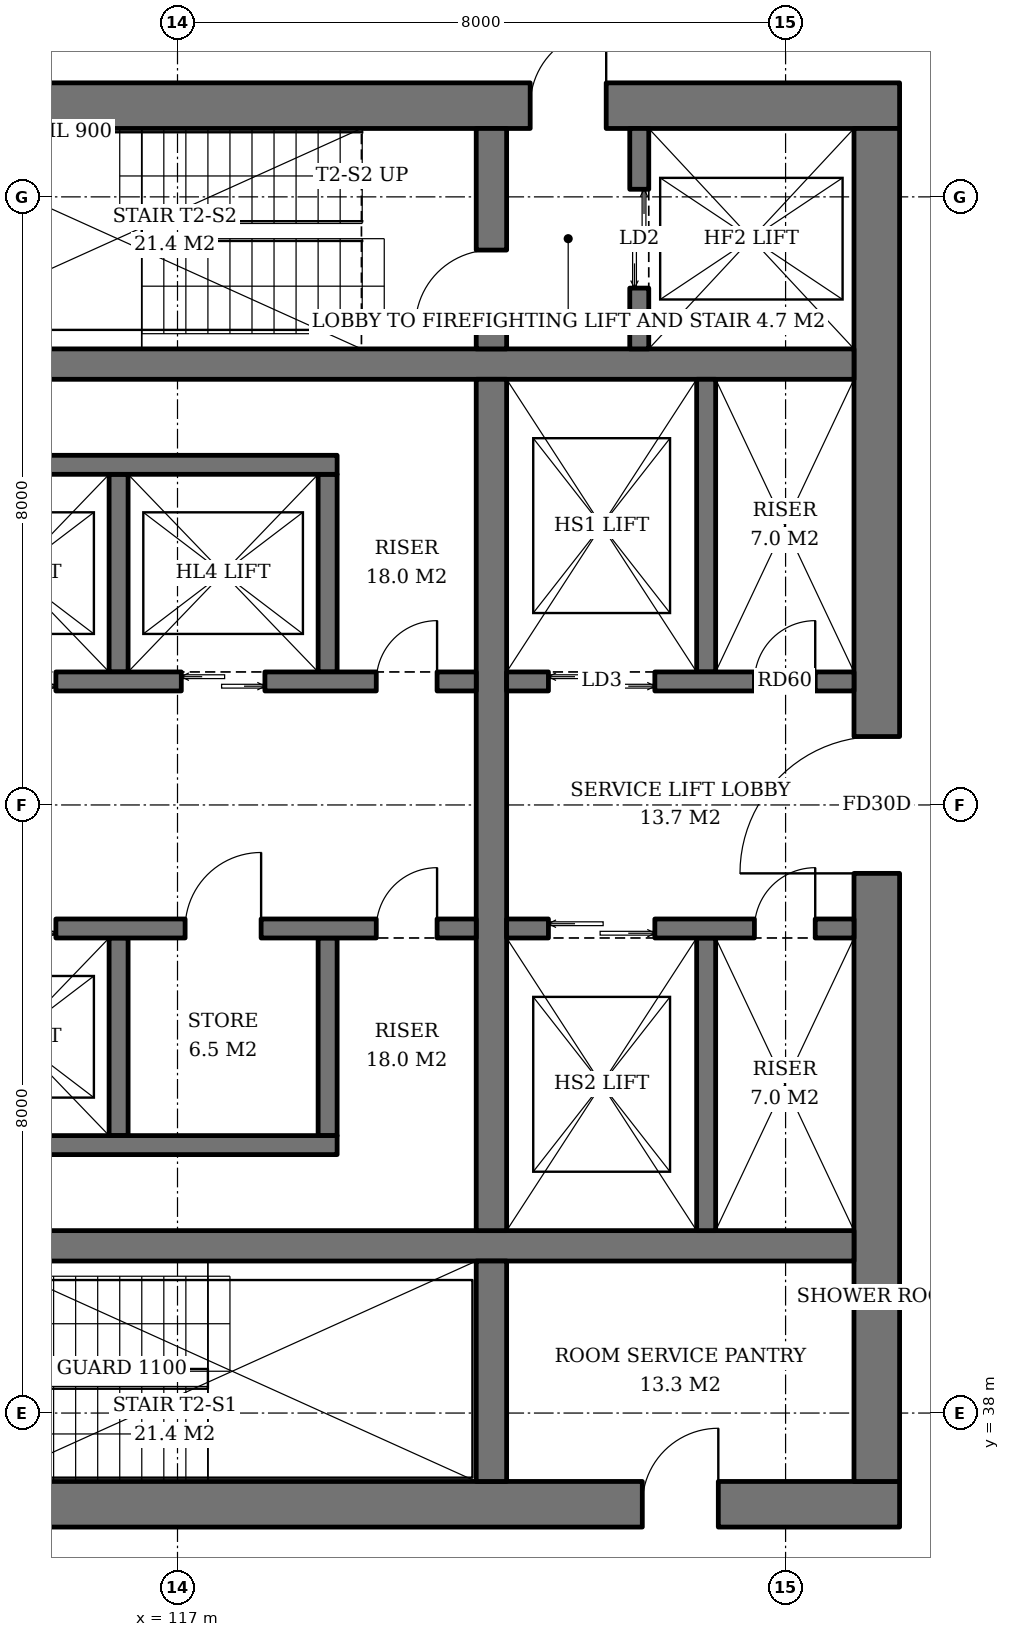
"""IFC4 building model, lengths in metres.
Left out: names, types, materials, properties, quantities, classifications, styles, units other than length and angle.
Written with IfcOpenShell. Run it as: python <this file> out.ifc"""

import sys

from ifc_helpers import new_model, si_unit, direction, frame, frame_2d, origin, place, context, subcontext, project, spatial, rectangle, extrude, element, fill, save


model = new_model("IFC4")
c1 = context("Model", 3, precision=1e-05, world=origin(), true_north=direction((0.0, 1.0)))
c2 = subcontext(c1, "Body", "Model", "MODEL_VIEW")
j1 = project(units=[si_unit("LENGTHUNIT", "METRE"), si_unit("PLANEANGLEUNIT", "RADIAN")], contexts=[c1])
p1 = place(None, origin())
s1 = spatial("IfcSite", under=j1, at=p1, CompositionType="ELEMENT")
p2 = place(p1, origin())
s2 = spatial("IfcBuilding", under=s1, at=p2, CompositionType="ELEMENT")
p3 = place(p2, frame((0.0, 0.0, 123.6)))
s3 = spatial("IfcBuildingStorey", under=s2, at=p3, CompositionType="ELEMENT", Elevation=123.6)
p4 = place(p3, frame((107.5, 36.8, 0.0), z_axis=(0.0, 0.0, 1.0), x_axis=(1.0, 0.0, 0.0)))
e1 = element("IfcWall", 1, at=p4, inside=s3, PredefinedType="SHEAR", context=c2, shape_type="SweptSolid", body=[
    extrude(rectangle(XDim=19.0, YDim=0.6, at=frame_2d((9.5, 0.0))), origin(), (0.0, 0.0, 1.0), 3.8),
])
p5 = place(p4, frame((3.9, 0.0, 0.0)))
e2 = element("IfcOpeningElement", 2, at=p5, cuts=e1, PredefinedType="OPENING", context=c2, shape_type="SweptSolid", body=[
    extrude(rectangle(XDim=1.0, YDim=2.1, at=frame_2d((0.5, 1.05))), frame((0.0, 0.31, 0.0), z_axis=(0.0, -1.0, 0.0), x_axis=(1.0, 0.0, 0.0)), (0.0, 0.0, 1.0), 0.62),
])
p6 = place(p4, frame((15.615, 0.0, 0.0)))
e3 = element("IfcOpeningElement", 3, at=p6, cuts=e1, PredefinedType="OPENING", context=c2, shape_type="SweptSolid", body=[
    extrude(rectangle(XDim=1.0, YDim=2.1, at=frame_2d((0.5, 1.05))), frame((0.0, 0.31, 0.0), z_axis=(0.0, -1.0, 0.0), x_axis=(1.0, 0.0, 0.0)), (0.0, 0.0, 1.0), 0.62),
])
p7 = place(p3, frame((107.5, 55.2, 0.0), z_axis=(0.0, 0.0, 1.0), x_axis=(1.0, 0.0, 0.0)))
e4 = element("IfcWall", 4, at=p7, inside=s3, PredefinedType="SHEAR", context=c2, shape_type="SweptSolid", body=[
    extrude(rectangle(XDim=19.0, YDim=0.6, at=frame_2d((9.5, 0.0))), origin(), (0.0, 0.0, 1.0), 3.8),
])
p8 = place(p7, frame((14.14, 0.0, 0.0)))
e5 = element("IfcOpeningElement", 5, at=p8, cuts=e4, PredefinedType="OPENING", context=c2, shape_type="SweptSolid", body=[
    extrude(rectangle(XDim=1.0, YDim=2.1, at=frame_2d((0.5, 1.05))), frame((0.0, 0.31, 0.0), z_axis=(0.0, -1.0, 0.0), x_axis=(1.0, 0.0, 0.0)), (0.0, 0.0, 1.0), 0.62),
])
p9 = place(p7, frame((1.024, 0.0, 0.0)))
e6 = element("IfcOpeningElement", 6, at=p9, cuts=e4, PredefinedType="OPENING", context=c2, shape_type="SweptSolid", body=[
    extrude(rectangle(XDim=1.0, YDim=2.1, at=frame_2d((0.5, 1.05))), frame((0.0, 0.31, 0.0), z_axis=(0.0, -1.0, 0.0), x_axis=(1.0, 0.0, 0.0)), (0.0, 0.0, 1.0), 0.62),
])
p10 = place(p7, frame((3.262, 0.0, 0.0)))
e7 = element("IfcOpeningElement", 7, at=p10, cuts=e4, PredefinedType="OPENING", context=c2, shape_type="SweptSolid", body=[
    extrude(rectangle(XDim=1.0, YDim=2.1, at=frame_2d((0.5, 1.05))), frame((0.0, 0.31, 0.0), z_axis=(0.0, -1.0, 0.0), x_axis=(1.0, 0.0, 0.0)), (0.0, 0.0, 1.0), 0.62),
])
p11 = place(p3, frame((126.2, 37.1, 0.0), z_axis=(0.0, 0.0, 1.0), x_axis=(0.0, 1.0, 0.0)))
e8 = element("IfcWall", 8, at=p11, inside=s3, PredefinedType="SHEAR", context=c2, shape_type="SweptSolid", body=[
    extrude(rectangle(XDim=17.8, YDim=0.6, at=frame_2d((8.9, 0.0))), origin(), (0.0, 0.0, 1.0), 3.8),
])
p12 = place(p11, frame((8.0, 0.0, 0.0)))
e9 = element("IfcOpeningElement", 9, at=p12, cuts=e8, PredefinedType="OPENING", context=c2, shape_type="SweptSolid", body=[
    extrude(rectangle(XDim=1.8, YDim=2.4, at=frame_2d((0.9, 1.2))), frame((0.0, 0.31, 0.0), z_axis=(0.0, -1.0, 0.0), x_axis=(1.0, 0.0, 0.0)), (0.0, 0.0, 1.0), 0.62),
])
for number, where, z_axis, x_axis in (
    (10, (108.1, 40.2, 0.0), (0.0, 0.0, 1.0), (1.0, 0.0, 0.0)),
    (11, (108.1, 51.8, 0.0), (0.0, 0.0, 1.0), (1.0, 0.0, 0.0)),
):
    element("IfcWall", number, at=place(p3, frame(where, z_axis=z_axis, x_axis=x_axis)), inside=s3, PredefinedType="SHEAR", context=c2, shape_type="SweptSolid", body=[
        extrude(rectangle(XDim=17.8, YDim=0.4, at=frame_2d((8.9, 0.0))), origin(), (0.0, 0.0, 1.0), 3.8),
    ])
p13 = place(p3, frame((121.13, 37.1, 0.0), z_axis=(0.0, 0.0, 1.0), x_axis=(0.0, 1.0, 0.0)))
e12 = element("IfcWall", 12, at=p13, inside=s3, PredefinedType="SHEAR", context=c2, shape_type="SweptSolid", body=[
    extrude(rectangle(XDim=2.9, YDim=0.4, at=frame_2d((1.45, 0.0))), origin(), (0.0, 0.0, 1.0), 3.8),
])
p14 = place(p3, frame((121.13, 40.4, 0.0), z_axis=(0.0, 0.0, 1.0), x_axis=(0.0, 1.0, 0.0)))
e13 = element("IfcWall", 13, at=p14, inside=s3, PredefinedType="SHEAR", context=c2, shape_type="SweptSolid", body=[
    extrude(rectangle(XDim=11.2, YDim=0.4, at=frame_2d((5.6, 0.0))), origin(), (0.0, 0.0, 1.0), 3.8),
])
p15 = place(p3, frame((121.13, 52.0, 0.0), z_axis=(0.0, 0.0, 1.0), x_axis=(0.0, 1.0, 0.0)))
e14 = element("IfcWall", 14, at=p15, inside=s3, PredefinedType="SHEAR", context=c2, shape_type="SweptSolid", body=[
    extrude(rectangle(XDim=2.9, YDim=0.4, at=frame_2d((1.45, 0.0))), origin(), (0.0, 0.0, 1.0), 3.8),
])
p16 = place(p15, frame((0.3, 0.0, 0.0)))
e15 = element("IfcOpeningElement", 15, at=p16, cuts=e14, PredefinedType="OPENING", context=c2, shape_type="SweptSolid", body=[
    extrude(rectangle(XDim=1.0, YDim=2.1, at=frame_2d((0.5, 1.05))), frame((0.0, 0.21, 0.0), z_axis=(0.0, -1.0, 0.0), x_axis=(1.0, 0.0, 0.0)), (0.0, 0.0, 1.0), 0.42),
])
p17 = place(p3, frame((123.075, 52.0, 0.0), z_axis=(0.0, 0.0, 1.0), x_axis=(0.0, 1.0, 0.0)))
e16 = element("IfcWall", 16, at=p17, inside=s3, PredefinedType="SHEAR", context=c2, shape_type="SweptSolid", body=[
    extrude(rectangle(XDim=2.9, YDim=0.25, at=frame_2d((1.45, 0.0))), origin(), (0.0, 0.0, 1.0), 3.8),
])
p18 = place(p17, frame((0.8, 0.0, 0.0)))
e17 = element("IfcOpeningElement", 17, at=p18, cuts=e16, PredefinedType="OPENING", context=c2, shape_type="SweptSolid", body=[
    extrude(rectangle(XDim=1.3, YDim=2.2, at=frame_2d((0.65, 1.1))), frame((0.0, 0.135, 0.0), z_axis=(0.0, -1.0, 0.0), x_axis=(1.0, 0.0, 0.0)), (0.0, 0.0, 1.0), 0.27),
])
for number, where, z_axis, x_axis in (
    (18, (116.225, 47.75, 0.0), (0.0, 0.0, 1.0), (0.0, 1.0, 0.0)),
    (19, (118.975, 47.75, 0.0), (0.0, 0.0, 1.0), (0.0, 1.0, 0.0)),
):
    element("IfcWall", number, at=place(p3, frame(where, z_axis=z_axis, x_axis=x_axis)), inside=s3, PredefinedType="SHEAR", context=c2, shape_type="SweptSolid", body=[
        extrude(rectangle(XDim=2.6, YDim=0.25, at=frame_2d((1.3, 0.0))), origin(), (0.0, 0.0, 1.0), 3.8),
    ])
p19 = place(p3, frame((108.1, 50.475, 0.0), z_axis=(0.0, 0.0, 1.0), x_axis=(1.0, 0.0, 0.0)))
e20 = element("IfcWall", 20, at=p19, inside=s3, PredefinedType="SHEAR", context=c2, shape_type="SweptSolid", body=[
    extrude(rectangle(XDim=11.0, YDim=0.25, at=frame_2d((5.5, 0.0))), origin(), (0.0, 0.0, 1.0), 3.8),
])
p20 = place(p3, frame((108.1, 47.625, 0.0), z_axis=(0.0, 0.0, 1.0), x_axis=(1.0, 0.0, 0.0)))
e21 = element("IfcWall", 21, at=p20, inside=s3, PredefinedType="SHEAR", context=c2, shape_type="SweptSolid", body=[
    extrude(rectangle(XDim=12.83, YDim=0.25, at=frame_2d((6.415, 0.0))), origin(), (0.0, 0.0, 1.0), 3.8),
])
p21 = place(p20, frame((0.7, 0.0, 0.0)))
e22 = element("IfcOpeningElement", 22, at=p21, cuts=e21, PredefinedType="OPENING", context=c2, shape_type="SweptSolid", body=[
    extrude(rectangle(XDim=1.1, YDim=2.2, at=frame_2d((0.55, 1.1))), frame((0.0, 0.135, 0.0), z_axis=(0.0, -1.0, 0.0), x_axis=(1.0, 0.0, 0.0)), (0.0, 0.0, 1.0), 0.27),
])
p22 = place(p20, frame((3.45, 0.0, 0.0)))
e23 = element("IfcOpeningElement", 23, at=p22, cuts=e21, PredefinedType="OPENING", context=c2, shape_type="SweptSolid", body=[
    extrude(rectangle(XDim=1.1, YDim=2.2, at=frame_2d((0.55, 1.1))), frame((0.0, 0.135, 0.0), z_axis=(0.0, -1.0, 0.0), x_axis=(1.0, 0.0, 0.0)), (0.0, 0.0, 1.0), 0.27),
])
p23 = place(p20, frame((6.2, 0.0, 0.0)))
e24 = element("IfcOpeningElement", 24, at=p23, cuts=e21, PredefinedType="OPENING", context=c2, shape_type="SweptSolid", body=[
    extrude(rectangle(XDim=1.1, YDim=2.2, at=frame_2d((0.55, 1.1))), frame((0.0, 0.135, 0.0), z_axis=(0.0, -1.0, 0.0), x_axis=(1.0, 0.0, 0.0)), (0.0, 0.0, 1.0), 0.27),
])
p24 = place(p20, frame((8.95, 0.0, 0.0)))
e25 = element("IfcOpeningElement", 25, at=p24, cuts=e21, PredefinedType="OPENING", context=c2, shape_type="SweptSolid", body=[
    extrude(rectangle(XDim=1.1, YDim=2.2, at=frame_2d((0.55, 1.1))), frame((0.0, 0.135, 0.0), z_axis=(0.0, -1.0, 0.0), x_axis=(1.0, 0.0, 0.0)), (0.0, 0.0, 1.0), 0.27),
])
p25 = place(p20, frame((11.515, 0.0, 0.0)))
e26 = element("IfcOpeningElement", 26, at=p25, cuts=e21, PredefinedType="OPENING", context=c2, shape_type="SweptSolid", body=[
    extrude(rectangle(XDim=0.8, YDim=2.0, at=frame_2d((0.4, 1.0))), frame((0.0, 0.135, 0.0), z_axis=(0.0, -1.0, 0.0), x_axis=(1.0, 0.0, 0.0)), (0.0, 0.0, 1.0), 0.27),
])
for number, where, z_axis, x_axis in (
    (27, (116.225, 44.25, 0.0), (0.0, 0.0, 1.0), (0.0, -1.0, 0.0)),
    (28, (118.975, 44.25, 0.0), (0.0, 0.0, 1.0), (0.0, -1.0, 0.0)),
):
    element("IfcWall", number, at=place(p3, frame(where, z_axis=z_axis, x_axis=x_axis)), inside=s3, PredefinedType="SHEAR", context=c2, shape_type="SweptSolid", body=[
        extrude(rectangle(XDim=2.6, YDim=0.25, at=frame_2d((1.3, 0.0))), origin(), (0.0, 0.0, 1.0), 3.8),
    ])
p26 = place(p3, frame((108.1, 41.525, 0.0), z_axis=(0.0, 0.0, 1.0), x_axis=(1.0, 0.0, 0.0)))
e29 = element("IfcWall", 29, at=p26, inside=s3, PredefinedType="SHEAR", context=c2, shape_type="SweptSolid", body=[
    extrude(rectangle(XDim=11.0, YDim=0.25, at=frame_2d((5.5, 0.0))), origin(), (0.0, 0.0, 1.0), 3.8),
])
p27 = place(p3, frame((108.1, 44.375, 0.0), z_axis=(0.0, 0.0, 1.0), x_axis=(1.0, 0.0, 0.0)))
e30 = element("IfcWall", 30, at=p27, inside=s3, PredefinedType="SHEAR", context=c2, shape_type="SweptSolid", body=[
    extrude(rectangle(XDim=12.83, YDim=0.25, at=frame_2d((6.415, 0.0))), origin(), (0.0, 0.0, 1.0), 3.8),
])
p28 = place(p27, frame((0.7, 0.0, 0.0)))
e31 = element("IfcOpeningElement", 31, at=p28, cuts=e30, PredefinedType="OPENING", context=c2, shape_type="SweptSolid", body=[
    extrude(rectangle(XDim=1.1, YDim=2.2, at=frame_2d((0.55, 1.1))), frame((0.0, 0.135, 0.0), z_axis=(0.0, -1.0, 0.0), x_axis=(1.0, 0.0, 0.0)), (0.0, 0.0, 1.0), 0.27),
])
p29 = place(p27, frame((3.45, 0.0, 0.0)))
e32 = element("IfcOpeningElement", 32, at=p29, cuts=e30, PredefinedType="OPENING", context=c2, shape_type="SweptSolid", body=[
    extrude(rectangle(XDim=1.1, YDim=2.2, at=frame_2d((0.55, 1.1))), frame((0.0, 0.135, 0.0), z_axis=(0.0, -1.0, 0.0), x_axis=(1.0, 0.0, 0.0)), (0.0, 0.0, 1.0), 0.27),
])
p30 = place(p27, frame((6.2, 0.0, 0.0)))
e33 = element("IfcOpeningElement", 33, at=p30, cuts=e30, PredefinedType="OPENING", context=c2, shape_type="SweptSolid", body=[
    extrude(rectangle(XDim=1.1, YDim=2.2, at=frame_2d((0.55, 1.1))), frame((0.0, 0.135, 0.0), z_axis=(0.0, -1.0, 0.0), x_axis=(1.0, 0.0, 0.0)), (0.0, 0.0, 1.0), 0.27),
])
p31 = place(p27, frame((9.0, 0.0, 0.0)))
e34 = element("IfcOpeningElement", 34, at=p31, cuts=e30, PredefinedType="OPENING", context=c2, shape_type="SweptSolid", body=[
    extrude(rectangle(XDim=1.0, YDim=2.1, at=frame_2d((0.5, 1.05))), frame((0.0, 0.135, 0.0), z_axis=(0.0, -1.0, 0.0), x_axis=(1.0, 0.0, 0.0)), (0.0, 0.0, 1.0), 0.27),
])
p32 = place(p27, frame((11.515, 0.0, 0.0)))
e35 = element("IfcOpeningElement", 35, at=p32, cuts=e30, PredefinedType="OPENING", context=c2, shape_type="SweptSolid", body=[
    extrude(rectangle(XDim=0.8, YDim=2.0, at=frame_2d((0.4, 1.0))), frame((0.0, 0.135, 0.0), z_axis=(0.0, -1.0, 0.0), x_axis=(1.0, 0.0, 0.0)), (0.0, 0.0, 1.0), 0.27),
])
p33 = place(p3, frame((123.955, 47.75, 0.0), z_axis=(0.0, 0.0, 1.0), x_axis=(0.0, 1.0, 0.0)))
e36 = element("IfcWall", 36, at=p33, inside=s3, PredefinedType="SHEAR", context=c2, shape_type="SweptSolid", body=[
    extrude(rectangle(XDim=3.85, YDim=0.25, at=frame_2d((1.925, 0.0))), origin(), (0.0, 0.0, 1.0), 3.8),
])
p34 = place(p3, frame((121.33, 47.625, 0.0), z_axis=(0.0, 0.0, 1.0), x_axis=(1.0, 0.0, 0.0)))
e37 = element("IfcWall", 37, at=p34, inside=s3, PredefinedType="SHEAR", context=c2, shape_type="SweptSolid", body=[
    extrude(rectangle(XDim=4.57, YDim=0.25, at=frame_2d((2.285, 0.0))), origin(), (0.0, 0.0, 1.0), 3.8),
])
p35 = place(p34, frame((0.55, 0.0, 0.0)))
e38 = element("IfcOpeningElement", 38, at=p35, cuts=e37, PredefinedType="OPENING", context=c2, shape_type="SweptSolid", body=[
    extrude(rectangle(XDim=1.4, YDim=2.4, at=frame_2d((0.7, 1.2))), frame((0.0, 0.135, 0.0), z_axis=(0.0, -1.0, 0.0), x_axis=(1.0, 0.0, 0.0)), (0.0, 0.0, 1.0), 0.27),
])
p36 = place(p34, frame((3.26, 0.0, 0.0)))
e39 = element("IfcOpeningElement", 39, at=p36, cuts=e37, PredefinedType="OPENING", context=c2, shape_type="SweptSolid", body=[
    extrude(rectangle(XDim=0.8, YDim=2.0, at=frame_2d((0.4, 1.0))), frame((0.0, 0.135, 0.0), z_axis=(0.0, -1.0, 0.0), x_axis=(1.0, 0.0, 0.0)), (0.0, 0.0, 1.0), 0.27),
])
p37 = place(p3, frame((123.955, 44.25, 0.0), z_axis=(0.0, 0.0, 1.0), x_axis=(0.0, -1.0, 0.0)))
e40 = element("IfcWall", 40, at=p37, inside=s3, PredefinedType="SHEAR", context=c2, shape_type="SweptSolid", body=[
    extrude(rectangle(XDim=3.85, YDim=0.25, at=frame_2d((1.925, 0.0))), origin(), (0.0, 0.0, 1.0), 3.8),
])
p38 = place(p3, frame((121.33, 44.375, 0.0), z_axis=(0.0, 0.0, 1.0), x_axis=(1.0, 0.0, 0.0)))
e41 = element("IfcWall", 41, at=p38, inside=s3, PredefinedType="SHEAR", context=c2, shape_type="SweptSolid", body=[
    extrude(rectangle(XDim=4.57, YDim=0.25, at=frame_2d((2.285, 0.0))), origin(), (0.0, 0.0, 1.0), 3.8),
])
p39 = place(p38, frame((0.55, 0.0, 0.0)))
e42 = element("IfcOpeningElement", 42, at=p39, cuts=e41, PredefinedType="OPENING", context=c2, shape_type="SweptSolid", body=[
    extrude(rectangle(XDim=1.4, YDim=2.4, at=frame_2d((0.7, 1.2))), frame((0.0, 0.135, 0.0), z_axis=(0.0, -1.0, 0.0), x_axis=(1.0, 0.0, 0.0)), (0.0, 0.0, 1.0), 0.27),
])
p40 = place(p38, frame((3.26, 0.0, 0.0)))
e43 = element("IfcOpeningElement", 43, at=p40, cuts=e41, PredefinedType="OPENING", context=c2, shape_type="SweptSolid", body=[
    extrude(rectangle(XDim=0.8, YDim=2.0, at=frame_2d((0.4, 1.0))), frame((0.0, 0.135, 0.0), z_axis=(0.0, -1.0, 0.0), x_axis=(1.0, 0.0, 0.0)), (0.0, 0.0, 1.0), 0.27),
])
p41 = place(p18, origin())
e44 = element("IfcDoor", 44, at=p41, inside=s3, OperationType="DOUBLE_DOOR_SLIDING", PredefinedType="DOOR", context=c2, shape_type="SweptSolid", body=[
    extrude(rectangle(XDim=1.3, YDim=2.2, at=frame_2d((0.65, 1.1))), frame((0.0, 0.025, 0.0), z_axis=(0.0, -1.0, 0.0), x_axis=(1.0, 0.0, 0.0)), (0.0, 0.0, 1.0), 0.05),
])
fill(e17, e44)
p42 = place(p23, origin())
e45 = element("IfcDoor", 45, at=p42, inside=s3, OperationType="DOUBLE_DOOR_SLIDING", PredefinedType="DOOR", context=c2, shape_type="SweptSolid", body=[
    extrude(rectangle(XDim=1.1, YDim=2.2, at=frame_2d((0.55, 1.1))), frame((0.0, 0.025, 0.0), z_axis=(0.0, -1.0, 0.0), x_axis=(1.0, 0.0, 0.0)), (0.0, 0.0, 1.0), 0.05),
])
fill(e24, e45)
p43 = place(p24, origin())
e46 = element("IfcDoor", 46, at=p43, inside=s3, OperationType="DOUBLE_DOOR_SLIDING", PredefinedType="DOOR", context=c2, shape_type="SweptSolid", body=[
    extrude(rectangle(XDim=1.1, YDim=2.2, at=frame_2d((0.55, 1.1))), frame((0.0, 0.025, 0.0), z_axis=(0.0, -1.0, 0.0), x_axis=(1.0, 0.0, 0.0)), (0.0, 0.0, 1.0), 0.05),
])
fill(e25, e46)
p44 = place(p25, origin())
e47 = element("IfcDoor", 47, at=p44, inside=s3, OperationType="SINGLE_SWING_RIGHT", PredefinedType="DOOR", context=c2, shape_type="SweptSolid", body=[
    extrude(rectangle(XDim=0.8, YDim=2.0, at=frame_2d((0.4, 1.0))), frame((0.0, 0.025, 0.0), z_axis=(0.0, -1.0, 0.0), x_axis=(1.0, 0.0, 0.0)), (0.0, 0.0, 1.0), 0.05),
])
fill(e26, e47)
p45 = place(p30, origin())
e48 = element("IfcDoor", 48, at=p45, inside=s3, OperationType="DOUBLE_DOOR_SLIDING", PredefinedType="DOOR", context=c2, shape_type="SweptSolid", body=[
    extrude(rectangle(XDim=1.1, YDim=2.2, at=frame_2d((0.55, 1.1))), frame((0.0, 0.025, 0.0), z_axis=(0.0, -1.0, 0.0), x_axis=(1.0, 0.0, 0.0)), (0.0, 0.0, 1.0), 0.05),
])
fill(e33, e48)
p46 = place(p31, origin())
e49 = element("IfcDoor", 49, at=p46, inside=s3, OperationType="SINGLE_SWING_RIGHT", PredefinedType="DOOR", context=c2, shape_type="SweptSolid", body=[
    extrude(rectangle(XDim=1.0, YDim=2.1, at=frame_2d((0.5, 1.05))), frame((0.0, 0.025, 0.0), z_axis=(0.0, -1.0, 0.0), x_axis=(1.0, 0.0, 0.0)), (0.0, 0.0, 1.0), 0.05),
])
fill(e34, e49)
p47 = place(p32, origin())
e50 = element("IfcDoor", 50, at=p47, inside=s3, OperationType="SINGLE_SWING_RIGHT", PredefinedType="DOOR", context=c2, shape_type="SweptSolid", body=[
    extrude(rectangle(XDim=0.8, YDim=2.0, at=frame_2d((0.4, 1.0))), frame((0.0, 0.025, 0.0), z_axis=(0.0, -1.0, 0.0), x_axis=(1.0, 0.0, 0.0)), (0.0, 0.0, 1.0), 0.05),
])
fill(e35, e50)
p48 = place(p35, origin())
e51 = element("IfcDoor", 51, at=p48, inside=s3, OperationType="DOUBLE_DOOR_SLIDING", PredefinedType="DOOR", context=c2, shape_type="SweptSolid", body=[
    extrude(rectangle(XDim=1.4, YDim=2.4, at=frame_2d((0.7, 1.2))), frame((0.0, 0.025, 0.0), z_axis=(0.0, -1.0, 0.0), x_axis=(1.0, 0.0, 0.0)), (0.0, 0.0, 1.0), 0.05),
])
fill(e38, e51)
p49 = place(p36, origin())
e52 = element("IfcDoor", 52, at=p49, inside=s3, OperationType="SINGLE_SWING_RIGHT", PredefinedType="DOOR", context=c2, shape_type="SweptSolid", body=[
    extrude(rectangle(XDim=0.8, YDim=2.0, at=frame_2d((0.4, 1.0))), frame((0.0, 0.025, 0.0), z_axis=(0.0, -1.0, 0.0), x_axis=(1.0, 0.0, 0.0)), (0.0, 0.0, 1.0), 0.05),
])
fill(e39, e52)
p50 = place(p39, origin())
e53 = element("IfcDoor", 53, at=p50, inside=s3, OperationType="DOUBLE_DOOR_SLIDING", PredefinedType="DOOR", context=c2, shape_type="SweptSolid", body=[
    extrude(rectangle(XDim=1.4, YDim=2.4, at=frame_2d((0.7, 1.2))), frame((0.0, 0.025, 0.0), z_axis=(0.0, -1.0, 0.0), x_axis=(1.0, 0.0, 0.0)), (0.0, 0.0, 1.0), 0.05),
])
fill(e42, e53)
p51 = place(p40, origin())
e54 = element("IfcDoor", 54, at=p51, inside=s3, OperationType="SINGLE_SWING_RIGHT", PredefinedType="DOOR", context=c2, shape_type="SweptSolid", body=[
    extrude(rectangle(XDim=0.8, YDim=2.0, at=frame_2d((0.4, 1.0))), frame((0.0, 0.025, 0.0), z_axis=(0.0, -1.0, 0.0), x_axis=(1.0, 0.0, 0.0)), (0.0, 0.0, 1.0), 0.05),
])
fill(e43, e54)
p52 = place(p16, origin())
e55 = element("IfcDoor", 55, at=p52, inside=s3, OperationType="SINGLE_SWING_LEFT", PredefinedType="DOOR", context=c2, shape_type="SweptSolid", body=[
    extrude(rectangle(XDim=1.0, YDim=2.1, at=frame_2d((0.5, 1.05))), frame((0.0, 0.025, 0.0), z_axis=(0.0, -1.0, 0.0), x_axis=(1.0, 0.0, 0.0)), (0.0, 0.0, 1.0), 0.05),
])
fill(e15, e55)
p53 = place(p8, origin())
e56 = element("IfcDoor", 56, at=p53, inside=s3, OperationType="SINGLE_SWING_RIGHT", PredefinedType="DOOR", context=c2, shape_type="SweptSolid", body=[
    extrude(rectangle(XDim=1.0, YDim=2.1, at=frame_2d((0.5, 1.05))), frame((0.0, 0.025, 0.0), z_axis=(0.0, -1.0, 0.0), x_axis=(1.0, 0.0, 0.0)), (0.0, 0.0, 1.0), 0.05),
])
fill(e5, e56)
p54 = place(p12, origin())
e57 = element("IfcDoor", 57, at=p54, inside=s3, OperationType="DOUBLE_DOOR_SINGLE_SWING", PredefinedType="DOOR", context=c2, shape_type="SweptSolid", body=[
    extrude(rectangle(XDim=1.8, YDim=2.4, at=frame_2d((0.9, 1.2))), frame((0.0, 0.025, 0.0), z_axis=(0.0, -1.0, 0.0), x_axis=(1.0, 0.0, 0.0)), (0.0, 0.0, 1.0), 0.05),
])
fill(e9, e57)
p55 = place(p6, origin())
e58 = element("IfcDoor", 58, at=p55, inside=s3, OperationType="SINGLE_SWING_RIGHT", PredefinedType="DOOR", context=c2, shape_type="SweptSolid", body=[
    extrude(rectangle(XDim=1.0, YDim=2.1, at=frame_2d((0.5, 1.05))), frame((0.0, 0.29, 0.0), z_axis=(0.0, -1.0, 0.0), x_axis=(1.0, 0.0, 0.0)), (0.0, 0.0, 1.0), 0.05),
])
fill(e3, e58)
save(model, sys.argv[1])
